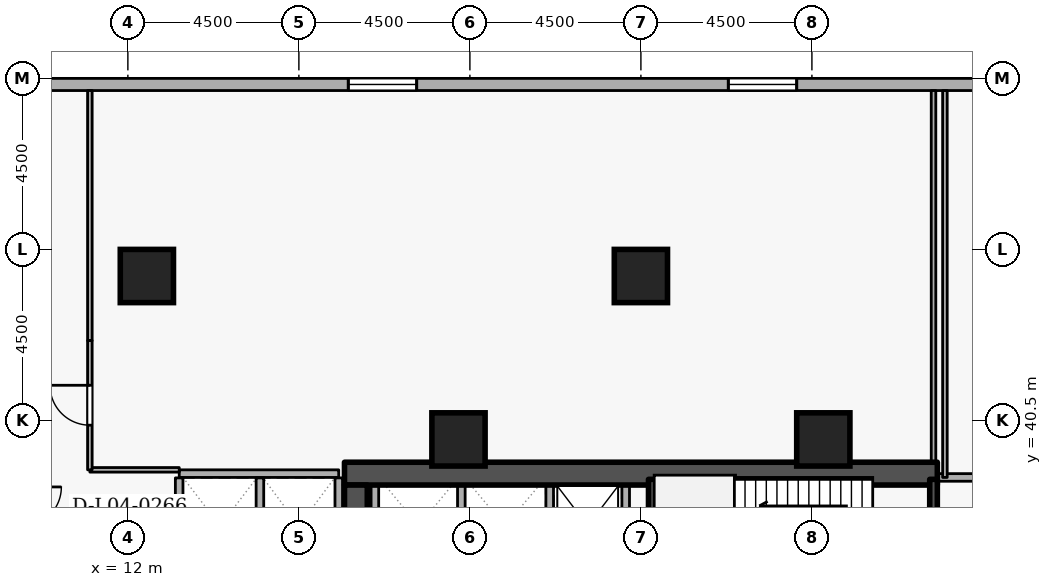
"""IFC4 building model, lengths in metres.
Left out: names, types, materials, properties, quantities, classifications, styles, units other than length and angle.
Written with IfcOpenShell. Run it as: python <this file> out.ifc"""

import sys

from ifc_helpers import new_model, si_unit, direction, frame, frame_2d, origin, origin_2d, place, context, subcontext, project, spatial, rectangle, extrude, element, fill, save


model = new_model("IFC4")
c1 = context("Model", 3, precision=1e-05, world=origin(), true_north=direction((0.0, 1.0)))
c2 = subcontext(c1, "Body", "Model", "MODEL_VIEW")
j1 = project(units=[si_unit("LENGTHUNIT", "METRE"), si_unit("PLANEANGLEUNIT", "RADIAN")], contexts=[c1])
p1 = place(None, origin())
s1 = spatial("IfcSite", under=j1, at=p1, CompositionType="ELEMENT")
p2 = place(p1, origin())
s2 = spatial("IfcBuilding", under=s1, at=p2, CompositionType="ELEMENT")
p3 = place(p2, frame((0.0, 0.0, 18.6)))
s3 = spatial("IfcBuildingStorey", under=s2, at=p3, CompositionType="ELEMENT", Elevation=18.6)
p4 = place(p3, frame((17.7, 39.1, 0.0), z_axis=(0.0, 0.0, 1.0), x_axis=(1.0, 0.0, 0.0)))
e1 = element("IfcWall", 1, at=p4, inside=s3, PredefinedType="SHEAR", context=c2, shape_type="SweptSolid", body=[
    extrude(rectangle(XDim=15.6, YDim=0.6, at=frame_2d((7.8, 0.0))), origin(), (0.0, 0.0, 1.0), 4.5),
])
p5 = place(p3, frame((18.0, 33.1, 0.0), z_axis=(0.0, 0.0, 1.0), x_axis=(0.0, 1.0, 0.0)))
e2 = element("IfcWall", 2, at=p5, inside=s3, PredefinedType="SHEAR", context=c2, shape_type="SweptSolid", body=[
    extrude(rectangle(XDim=5.7, YDim=0.6, at=frame_2d((2.85, 0.0))), origin(), (0.0, 0.0, 1.0), 4.5),
])
for number, where, z_axis, x_axis in (
    (3, (12.5, 44.3, 0.0), (0.0, 0.0, 1.0), (1.0, 0.0, 0.0)),
    (4, (25.5, 44.3, 0.0), (0.0, 0.0, 1.0), (1.0, 0.0, 0.0)),
    (5, (20.7, 40.0, 0.0), (0.0, 0.0, 1.0), (1.0, 0.0, 0.0)),
    (6, (30.3, 40.0, 0.0), (0.0, 0.0, 1.0), (1.0, 0.0, 0.0)),
):
    element("IfcColumn", number, at=place(p3, frame(where, z_axis=z_axis, x_axis=x_axis)), inside=s3, PredefinedType="COLUMN", context=c2, shape_type="SweptSolid", body=[
        extrude(rectangle(XDim=1.4, YDim=1.4, at=origin_2d()), origin(), (0.0, 0.0, 1.0), 4.5),
    ])
p6 = place(p3, frame((42.4, 49.34, 0.0), z_axis=(0.0, 0.0, 1.0), x_axis=(-1.0, 0.0, 0.0)))
e7 = element("IfcWall", 7, at=p6, inside=s3, PredefinedType="STANDARD", context=c2, shape_type="SweptSolid", body=[
    extrude(rectangle(XDim=39.4, YDim=0.32, at=frame_2d((19.7, 0.0))), origin(), (0.0, 0.0, 1.0), 3.56),
])
p7 = place(p6, frame((12.8, 0.0, 0.78)))
e8 = element("IfcOpeningElement", 8, at=p7, cuts=e7, PredefinedType="OPENING", context=c2, shape_type="SweptSolid", body=[
    extrude(rectangle(XDim=1.8, YDim=2.15, at=frame_2d((0.9, 1.075))), frame((0.0, 0.17, 0.0), z_axis=(0.0, -1.0, 0.0), x_axis=(1.0, 0.0, 0.0)), (0.0, 0.0, 1.0), 0.34),
])
p8 = place(p6, frame((22.8, 0.0, 0.78)))
e9 = element("IfcOpeningElement", 9, at=p8, cuts=e7, PredefinedType="OPENING", context=c2, shape_type="SweptSolid", body=[
    extrude(rectangle(XDim=1.8, YDim=2.15, at=frame_2d((0.9, 1.075))), frame((0.0, 0.17, 0.0), z_axis=(0.0, -1.0, 0.0), x_axis=(1.0, 0.0, 0.0)), (0.0, 0.0, 1.0), 0.34),
])
for number, where, z_axis, x_axis in (
    (10, (25.1, 36.352, 0.0), (0.0, 0.0, 1.0), (0.0, 1.0, 0.0)),
    (11, (23.1, 36.352, 0.0), (0.0, 0.0, 1.0), (0.0, 1.0, 0.0)),
    (12, (20.775, 36.352, 0.0), (0.0, 0.0, 1.0), (0.0, 1.0, 0.0)),
    (13, (18.5, 36.352, 0.0), (0.0, 0.0, 1.0), (0.0, 1.0, 0.0)),
):
    element("IfcWall", number, at=place(p3, frame(where, z_axis=z_axis, x_axis=x_axis)), inside=s3, PredefinedType="STANDARD", context=c2, shape_type="SweptSolid", body=[
        extrude(rectangle(XDim=2.436, YDim=0.2, at=frame_2d((1.218, 0.0))), origin(), (0.0, 0.0, 1.0), 4.16),
    ])
p9 = place(p3, frame((13.352, 39.1, 0.0), z_axis=(0.0, 0.0, 1.0), x_axis=(1.0, 0.0, 0.0)))
e14 = element("IfcWall", 14, at=p9, inside=s3, PredefinedType="STANDARD", context=c2, shape_type="SweptSolid", body=[
    extrude(rectangle(XDim=4.196, YDim=0.2, at=frame_2d((2.098, 0.0))), origin(), (0.0, 0.0, 1.0), 4.16),
])
p10 = place(p3, frame((17.55, 36.352, 0.0), z_axis=(0.0, 0.0, 1.0), x_axis=(0.0, 1.0, 0.0)))
e15 = element("IfcWall", 15, at=p10, inside=s3, PredefinedType="STANDARD", context=c2, shape_type="SweptSolid", body=[
    extrude(rectangle(XDim=2.636, YDim=0.2, at=frame_2d((1.318, 0.0))), origin(), (0.0, 0.0, 1.0), 3.365),
])
for number, where, z_axis, x_axis in (
    (16, (15.475, 36.352, 0.0), (0.0, 0.0, 1.0), (0.0, 1.0, 0.0)),
    (17, (13.35, 36.352, 0.0), (0.0, 0.0, 1.0), (0.0, 1.0, 0.0)),
):
    element("IfcWall", number, at=place(p3, frame(where, z_axis=z_axis, x_axis=x_axis)), inside=s3, PredefinedType="STANDARD", context=c2, shape_type="SweptSolid", body=[
        extrude(rectangle(XDim=2.636, YDim=0.2, at=frame_2d((1.318, 0.0))), origin(), (0.0, 0.0, 1.0), 4.16),
    ])
p11 = place(p3, frame((33.2, 38.95, 0.0), z_axis=(0.0, 0.0, 1.0), x_axis=(0.0, -1.0, 0.0)))
e18 = element("IfcWall", 18, at=p11, inside=s3, PredefinedType="SHEAR", context=c2, shape_type="SweptSolid", body=[
    extrude(rectangle(XDim=3.35, YDim=0.2, at=frame_2d((1.675, 0.0))), origin(), (0.0, 0.0, 1.0), 4.5),
])
p12 = place(p11, frame((1.125, 0.0, 0.0)))
e19 = element("IfcOpeningElement", 19, at=p12, cuts=e18, PredefinedType="OPENING", context=c2, shape_type="SweptSolid", body=[
    extrude(rectangle(XDim=1.1, YDim=2.1, at=frame_2d((0.55, 1.05))), frame((0.0, 0.11, 0.0), z_axis=(0.0, -1.0, 0.0), x_axis=(1.0, 0.0, 0.0)), (0.0, 0.0, 1.0), 0.22),
])
p13 = place(p3, frame((25.8, 35.6, 0.0), z_axis=(0.0, 0.0, 1.0), x_axis=(0.0, 1.0, 0.0)))
e20 = element("IfcWall", 20, at=p13, inside=s3, PredefinedType="SHEAR", context=c2, shape_type="SweptSolid", body=[
    extrude(rectangle(XDim=3.35, YDim=0.2, at=frame_2d((1.675, 0.0))), origin(), (0.0, 0.0, 1.0), 4.5),
])
p14 = place(p3, frame((35.8, 39.0, 0.0), z_axis=(0.0, 0.0, 1.0), x_axis=(-1.0, 0.0, 0.0)))
e21 = element("IfcWall", 21, at=p14, inside=s3, PredefinedType="STANDARD", context=c2, shape_type="SweptSolid", body=[
    extrude(rectangle(XDim=2.5, YDim=0.2, at=frame_2d((1.25, 0.0))), origin(), (0.0, 0.0, 1.0), 4.16),
])
p15 = place(p3, frame((33.5, 39.0, 0.0), z_axis=(0.0, 0.0, 1.0), x_axis=(0.0, 1.0, 0.0)))
e22 = element("IfcWall", 22, at=p15, inside=s3, PredefinedType="PARTITIONING", context=c2, shape_type="SweptSolid", body=[
    extrude(rectangle(XDim=10.18, YDim=0.12, at=frame_2d((5.09, 0.0))), origin(), (0.0, 0.0, 1.0), 4.16),
])
p16 = place(p3, frame((11.0, 42.6, 0.0), z_axis=(0.0, 0.0, 1.0), x_axis=(0.0, 1.0, 0.0)))
e23 = element("IfcWall", 23, at=p16, inside=s3, PredefinedType="PARTITIONING", context=c2, shape_type="SweptSolid", body=[
    extrude(rectangle(XDim=6.58, YDim=0.12, at=frame_2d((3.29, 0.0))), origin(), (0.0, 0.0, 1.0), 4.16),
])
p17 = place(p3, frame((33.2, 49.18, 0.0), z_axis=(0.0, 0.0, 1.0), x_axis=(0.0, -1.0, 0.0)))
e24 = element("IfcWall", 24, at=p17, inside=s3, PredefinedType="PARTITIONING", context=c2, shape_type="SweptSolid", body=[
    extrude(rectangle(XDim=9.98, YDim=0.12, at=frame_2d((4.99, 0.0))), origin(), (0.0, 0.0, 1.0), 4.16),
])
p18 = place(p3, frame((13.352, 39.2, 0.0), z_axis=(0.0, 0.0, 1.0), x_axis=(-1.0, 0.0, 0.0)))
e25 = element("IfcWall", 25, at=p18, inside=s3, PredefinedType="PARTITIONING", context=c2, shape_type="SweptSolid", body=[
    extrude(rectangle(XDim=2.352, YDim=0.12, at=frame_2d((1.176, 0.0))), origin(), (0.0, 0.0, 1.0), 4.16),
])
p19 = place(p3, frame((11.0, 39.2, 0.0), z_axis=(0.0, 0.0, 1.0), x_axis=(0.0, 1.0, 0.0)))
e26 = element("IfcWall", 26, at=p19, inside=s3, PredefinedType="PARTITIONING", context=c2, shape_type="SweptSolid", body=[
    extrude(rectangle(XDim=3.4, YDim=0.12, at=frame_2d((1.7, 0.0))), origin(), (0.0, 0.0, 1.0), 4.16),
])
p20 = place(p19, frame((1.175, 0.0, 0.0)))
e27 = element("IfcOpeningElement", 27, at=p20, cuts=e26, PredefinedType="OPENING", context=c2, shape_type="SweptSolid", body=[
    extrude(rectangle(XDim=1.05, YDim=2.1, at=frame_2d((0.525, 1.05))), frame((0.0, 0.07, 0.0), z_axis=(0.0, -1.0, 0.0), x_axis=(1.0, 0.0, 0.0)), (0.0, 0.0, 1.0), 0.14),
])
p21 = place(p7, origin())
e28 = element("IfcWindow", 28, at=p21, inside=s3, PartitioningType="SINGLE_PANEL", PredefinedType="WINDOW", context=c2, shape_type="SweptSolid", body=[
    extrude(rectangle(XDim=1.8, YDim=2.15, at=frame_2d((0.9, 1.075))), frame((0.0, 0.03, 0.0), z_axis=(0.0, -1.0, 0.0), x_axis=(1.0, 0.0, 0.0)), (0.0, 0.0, 1.0), 0.06),
])
fill(e8, e28)
p22 = place(p8, origin())
e29 = element("IfcWindow", 29, at=p22, inside=s3, PartitioningType="SINGLE_PANEL", PredefinedType="WINDOW", context=c2, shape_type="SweptSolid", body=[
    extrude(rectangle(XDim=1.8, YDim=2.15, at=frame_2d((0.9, 1.075))), frame((0.0, 0.03, 0.0), z_axis=(0.0, -1.0, 0.0), x_axis=(1.0, 0.0, 0.0)), (0.0, 0.0, 1.0), 0.06),
])
fill(e9, e29)
p23 = place(p20, origin())
e30 = element("IfcDoor", 30, at=p23, inside=s3, OperationType="SINGLE_SWING_RIGHT", PredefinedType="DOOR", context=c2, shape_type="SweptSolid", body=[
    extrude(rectangle(XDim=1.05, YDim=2.1, at=frame_2d((0.525, 1.05))), frame((0.0, 0.025, 0.0), z_axis=(0.0, -1.0, 0.0), x_axis=(1.0, 0.0, 0.0)), (0.0, 0.0, 1.0), 0.05),
])
fill(e27, e30)
save(model, sys.argv[1])
